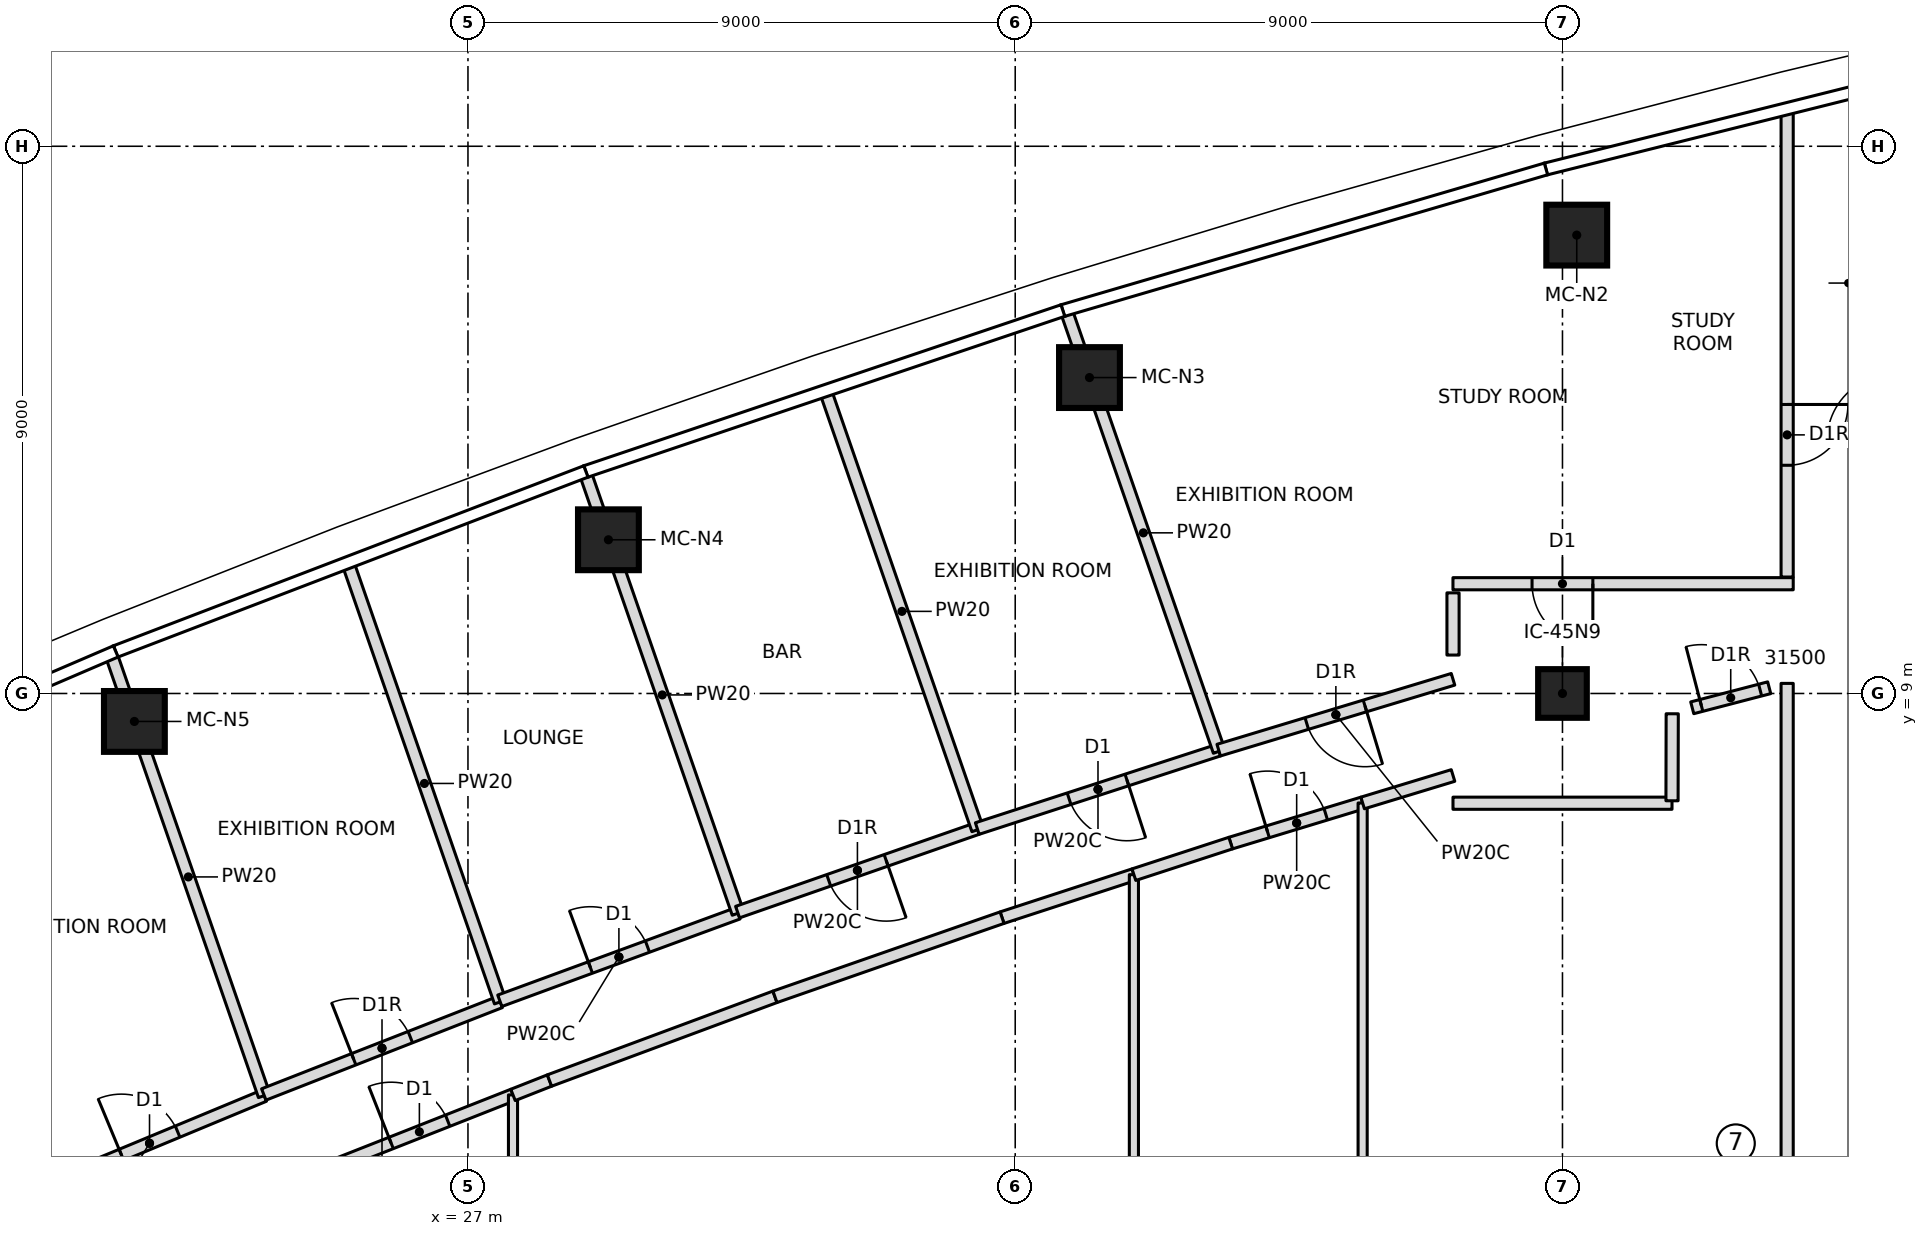
"""IFC4 building model, lengths in metres.
Left out: names, types, materials, properties, quantities, classifications, styles, units other than length and angle.
Written with IfcOpenShell. Run it as: python <this file> out.ifc"""

import sys

from ifc_helpers import new_model, si_unit, direction, frame, frame_2d, origin, origin_2d, place, context, subcontext, project, spatial, rectangle, extrude, element, fill, save


model = new_model("IFC4")
c1 = context("Model", 3, precision=1e-05, world=origin(), true_north=direction((0.0, 1.0)))
c2 = subcontext(c1, "Body", "Model", "MODEL_VIEW")
j1 = project(units=[si_unit("LENGTHUNIT", "METRE"), si_unit("PLANEANGLEUNIT", "RADIAN")], contexts=[c1])
p1 = place(None, origin())
s1 = spatial("IfcSite", under=j1, at=p1, CompositionType="ELEMENT")
p2 = place(p1, origin())
s2 = spatial("IfcBuilding", under=s1, at=p2, CompositionType="ELEMENT")
p3 = place(p2, frame((0.0, 0.0, 308.6)))
s3 = spatial("IfcBuildingStorey", under=s2, at=p3, CompositionType="ELEMENT", Elevation=308.6)
for number, where, z_axis, x_axis in (
    (1, (45.235, 16.539, 0.0), (0.0, 0.0, 1.0), (1.0, 0.0, 0.0)),
    (2, (37.221, 14.196, 0.0), (0.0, 0.0, 1.0), (1.0, 0.0, 0.0)),
    (3, (29.31, 11.528, 0.0), (0.0, 0.0, 1.0), (1.0, 0.0, 0.0)),
    (4, (21.514, 8.54, 0.0), (0.0, 0.0, 1.0), (1.0, 0.0, 0.0)),
):
    element("IfcColumn", number, at=place(p3, frame(where, z_axis=z_axis, x_axis=x_axis)), inside=s3, PredefinedType="COLUMN", context=c2, shape_type="SweptSolid", body=[
        extrude(rectangle(XDim=1.0, YDim=1.0, at=origin_2d()), origin(), (0.0, 0.0, 1.0), 4.6),
    ])
p4 = place(p3, frame((45.0, 9.0, 0.0), z_axis=(0.0, 0.0, 1.0), x_axis=(1.0, 0.0, 0.0)))
e5 = element("IfcColumn", 5, at=p4, inside=s3, PredefinedType="COLUMN", context=c2, shape_type="SweptSolid", body=[
    extrude(rectangle(XDim=0.8, YDim=0.8, at=origin_2d()), origin(), (0.0, 0.0, 1.0), 4.6),
])
p5 = place(p3, frame((19.877, 0.819, 0.0), z_axis=(0.0, 0.0, 1.0), x_axis=(0.923511375565, 0.383571035405, 0.0)))
e6 = element("IfcWall", 6, at=p5, inside=s3, PredefinedType="PARTITIONING", context=c2, shape_type="SweptSolid", body=[
    extrude(rectangle(XDim=4.084, YDim=0.2, at=frame_2d((2.042, 0.0))), origin(), (0.0, 0.0, 1.0), 4.3),
])
p6 = place(p5, frame((1.542, 0.0, 0.0)))
e7 = element("IfcOpeningElement", 7, at=p6, cuts=e6, PredefinedType="OPENING", context=c2, shape_type="SweptSolid", body=[
    extrude(rectangle(XDim=1.0, YDim=2.1, at=frame_2d((0.5, 1.05))), frame((0.0, 0.11, 0.0), z_axis=(0.0, -1.0, 0.0), x_axis=(1.0, 0.0, 0.0)), (0.0, 0.0, 1.0), 0.22),
])
p7 = place(p3, frame((23.649, 2.386, 0.0), z_axis=(0.0, 0.0, 1.0), x_axis=(-0.327708457606, 0.944778898374, 0.0)))
e8 = element("IfcWall", 8, at=p7, inside=s3, PredefinedType="PARTITIONING", context=c2, shape_type="SweptSolid", body=[
    extrude(rectangle(XDim=7.615, YDim=0.2, at=frame_2d((3.807, 0.0))), origin(), (0.0, 0.0, 1.0), 4.3),
])
p8 = place(p3, frame((23.642, 2.405, 0.0), z_axis=(0.0, 0.0, 1.0), x_axis=(0.9311815176, 0.364555868532, 0.0)))
e9 = element("IfcWall", 9, at=p8, inside=s3, PredefinedType="PARTITIONING", context=c2, shape_type="SweptSolid", body=[
    extrude(rectangle(XDim=4.176, YDim=0.2, at=frame_2d((2.088, 0.0))), origin(), (0.0, 0.0, 1.0), 4.3),
])
p9 = place(p8, frame((1.588, 0.0, 0.0)))
e10 = element("IfcOpeningElement", 10, at=p9, cuts=e9, PredefinedType="OPENING", context=c2, shape_type="SweptSolid", body=[
    extrude(rectangle(XDim=1.0, YDim=2.1, at=frame_2d((0.5, 1.05))), frame((0.0, 0.11, 0.0), z_axis=(0.0, -1.0, 0.0), x_axis=(1.0, 0.0, 0.0)), (0.0, 0.0, 1.0), 0.22),
])
p10 = place(p3, frame((27.531, 3.927, 0.0), z_axis=(0.0, 0.0, 1.0), x_axis=(-0.327730022722, 0.944771417966, 0.0)))
e11 = element("IfcWall", 11, at=p10, inside=s3, PredefinedType="PARTITIONING", context=c2, shape_type="SweptSolid", body=[
    extrude(rectangle(XDim=7.607, YDim=0.2, at=frame_2d((3.803, 0.0))), origin(), (0.0, 0.0, 1.0), 4.3),
])
p11 = place(p3, frame((27.524, 3.946, 0.0), z_axis=(0.0, 0.0, 1.0), x_axis=(0.938626470437, 0.344935282329, 0.0)))
e12 = element("IfcWall", 12, at=p11, inside=s3, PredefinedType="PARTITIONING", context=c2, shape_type="SweptSolid", body=[
    extrude(rectangle(XDim=4.173, YDim=0.2, at=frame_2d((2.086, 0.0))), origin(), (0.0, 0.0, 1.0), 4.3),
])
p12 = place(p11, frame((1.586, 0.0, 0.0)))
e13 = element("IfcOpeningElement", 13, at=p12, cuts=e12, PredefinedType="OPENING", context=c2, shape_type="SweptSolid", body=[
    extrude(rectangle(XDim=1.0, YDim=2.1, at=frame_2d((0.5, 1.05))), frame((0.0, 0.11, 0.0), z_axis=(0.0, -1.0, 0.0), x_axis=(1.0, 0.0, 0.0)), (0.0, 0.0, 1.0), 0.22),
])
p13 = place(p3, frame((31.441, 5.385, 0.0), z_axis=(0.0, 0.0, 1.0), x_axis=(-0.327746961166, 0.944765542051, 0.0)))
e14 = element("IfcWall", 14, at=p13, inside=s3, PredefinedType="PARTITIONING", context=c2, shape_type="SweptSolid", body=[
    extrude(rectangle(XDim=7.602, YDim=0.2, at=frame_2d((3.801, 0.0))), origin(), (0.0, 0.0, 1.0), 4.3),
])
p14 = place(p3, frame((35.376, 6.779, 0.0), z_axis=(0.0, 0.0, 1.0), x_axis=(-0.944236129554, -0.329269086986, 0.0)))
e15 = element("IfcWall", 15, at=p14, inside=s3, PredefinedType="PARTITIONING", context=c2, shape_type="SweptSolid", body=[
    extrude(rectangle(XDim=4.174, YDim=0.2, at=frame_2d((2.087, 0.0))), origin(), (0.0, 0.0, 1.0), 4.3),
])
p15 = place(p14, frame((1.587, 0.0, 0.0)))
e16 = element("IfcOpeningElement", 16, at=p15, cuts=e15, PredefinedType="OPENING", context=c2, shape_type="SweptSolid", body=[
    extrude(rectangle(XDim=1.0, YDim=2.1, at=frame_2d((0.5, 1.05))), frame((0.0, 0.11, 0.0), z_axis=(0.0, -1.0, 0.0), x_axis=(1.0, 0.0, 0.0)), (0.0, 0.0, 1.0), 0.22),
])
p16 = place(p3, frame((35.382, 6.76, 0.0), z_axis=(0.0, 0.0, 1.0), x_axis=(-0.327699570064, 0.944781981083, 0.0)))
e17 = element("IfcWall", 17, at=p16, inside=s3, PredefinedType="PARTITIONING", context=c2, shape_type="SweptSolid", body=[
    extrude(rectangle(XDim=7.601, YDim=0.2, at=frame_2d((3.801, 0.0))), origin(), (0.0, 0.0, 1.0), 4.3),
])
p17 = place(p3, frame((39.347, 8.068, 0.0), z_axis=(0.0, 0.0, 1.0), x_axis=(-0.951104948213, -0.308867896493, 0.0)))
e18 = element("IfcWall", 18, at=p17, inside=s3, PredefinedType="PARTITIONING", context=c2, shape_type="SweptSolid", body=[
    extrude(rectangle(XDim=4.175, YDim=0.2, at=frame_2d((2.087, 0.0))), origin(), (0.0, 0.0, 1.0), 4.3),
])
p18 = place(p17, frame((1.588, 0.0, 0.0)))
e19 = element("IfcOpeningElement", 19, at=p18, cuts=e18, PredefinedType="OPENING", context=c2, shape_type="SweptSolid", body=[
    extrude(rectangle(XDim=1.0, YDim=2.1, at=frame_2d((0.5, 1.05))), frame((0.0, 0.11, 0.0), z_axis=(0.0, -1.0, 0.0), x_axis=(1.0, 0.0, 0.0)), (0.0, 0.0, 1.0), 0.22),
])
p19 = place(p3, frame((39.354, 8.049, 0.0), z_axis=(0.0, 0.0, 1.0), x_axis=(-0.327741126954, 0.944767565967, 0.0)))
e20 = element("IfcWall", 20, at=p19, inside=s3, PredefinedType="PARTITIONING", context=c2, shape_type="SweptSolid", body=[
    extrude(rectangle(XDim=7.606, YDim=0.2, at=frame_2d((3.803, 0.0))), origin(), (0.0, 0.0, 1.0), 4.3),
])
p20 = place(p3, frame((43.2, 9.233, 0.0), z_axis=(0.0, 0.0, 1.0), x_axis=(-0.957187982889, -0.289467036833, 0.0)))
e21 = element("IfcWall", 21, at=p20, inside=s3, PredefinedType="PARTITIONING", context=c2, shape_type="SweptSolid", body=[
    extrude(rectangle(XDim=4.026, YDim=0.2, at=frame_2d((2.013, 0.0))), origin(), (0.0, 0.0, 1.0), 4.3),
])
p21 = place(p20, frame((1.513, 0.0, 0.0)))
e22 = element("IfcOpeningElement", 22, at=p21, cuts=e21, PredefinedType="OPENING", context=c2, shape_type="SweptSolid", body=[
    extrude(rectangle(XDim=1.0, YDim=2.1, at=frame_2d((0.5, 1.05))), frame((0.0, 0.11, 0.0), z_axis=(0.0, -1.0, 0.0), x_axis=(1.0, 0.0, 0.0)), (0.0, 0.0, 1.0), 0.22),
])
p22 = place(p3, frame((24.661, 1.183, 0.0), z_axis=(0.0, 0.0, 1.0), x_axis=(0.930276475833, 0.366859208023, 0.0)))
e23 = element("IfcWall", 23, at=p22, inside=s3, PredefinedType="PARTITIONING", context=c2, shape_type="SweptSolid", body=[
    extrude(rectangle(XDim=3.31, YDim=0.2, at=frame_2d((1.655, 0.0))), origin(), (0.0, 0.0, 1.0), 4.3),
])
p23 = place(p22, frame((1.155, 0.0, 0.0)))
e24 = element("IfcOpeningElement", 24, at=p23, cuts=e23, PredefinedType="OPENING", context=c2, shape_type="SweptSolid", body=[
    extrude(rectangle(XDim=1.0, YDim=2.1, at=frame_2d((0.5, 1.05))), frame((0.0, 0.11, 0.0), z_axis=(0.0, -1.0, 0.0), x_axis=(1.0, 0.0, 0.0)), (0.0, 0.0, 1.0), 0.22),
])
p24 = place(p3, frame((27.741, -2.397, 0.0), z_axis=(0.0, 0.0, 1.0), x_axis=(0.0, 1.0, 0.0)))
e25 = element("IfcWall", 25, at=p24, inside=s3, PredefinedType="PARTITIONING", context=c2, shape_type="SweptSolid", body=[
    extrude(rectangle(XDim=4.795, YDim=0.15, at=frame_2d((2.397, 0.0))), origin(), (0.0, 0.0, 1.0), 4.3),
])
p25 = place(p3, frame((35.783, 5.313, 0.0), z_axis=(0.0, 0.0, 1.0), x_axis=(0.950697596331, 0.310119461386, 0.0)))
e26 = element("IfcWall", 26, at=p25, inside=s3, PredefinedType="PARTITIONING", context=c2, shape_type="SweptSolid", body=[
    extrude(rectangle(XDim=2.281, YDim=0.2, at=frame_2d((1.14, 0.0))), origin(), (0.0, 0.0, 1.0), 4.3),
])
p26 = place(p3, frame((27.741, 2.397, 0.0), z_axis=(0.0, 0.0, 1.0), x_axis=(0.930318406692, 0.366752862524, 0.0)))
e27 = element("IfcWall", 27, at=p26, inside=s3, PredefinedType="PARTITIONING", context=c2, shape_type="SweptSolid", body=[
    extrude(rectangle(XDim=0.645, YDim=0.2, at=frame_2d((0.323, 0.0))), origin(), (0.0, 0.0, 1.0), 4.3),
])
p27 = place(p3, frame((28.341, 2.634, 0.0), z_axis=(0.0, 0.0, 1.0), x_axis=(0.937463259708, 0.348084237933, 0.0)))
e28 = element("IfcWall", 28, at=p27, inside=s3, PredefinedType="PARTITIONING", context=c2, shape_type="SweptSolid", body=[
    extrude(rectangle(XDim=3.955, YDim=0.2, at=frame_2d((1.978, 0.0))), origin(), (0.0, 0.0, 1.0), 4.3),
])
p28 = place(p3, frame((32.049, 4.011, 0.0), z_axis=(0.0, 0.0, 1.0), x_axis=(0.94426757098, 0.329178909402, 0.0)))
e29 = element("IfcWall", 29, at=p28, inside=s3, PredefinedType="PARTITIONING", context=c2, shape_type="SweptSolid", body=[
    extrude(rectangle(XDim=3.955, YDim=0.2, at=frame_2d((1.978, 0.0))), origin(), (0.0, 0.0, 1.0), 4.3),
])
p29 = place(p3, frame((37.952, -6.02, 0.0), z_axis=(0.0, 0.0, 1.0), x_axis=(0.0, 1.0, 0.0)))
e30 = element("IfcWall", 30, at=p29, inside=s3, PredefinedType="PARTITIONING", context=c2, shape_type="SweptSolid", body=[
    extrude(rectangle(XDim=12.04, YDim=0.15, at=frame_2d((6.02, 0.0))), origin(), (0.0, 0.0, 1.0), 4.3),
])
p30 = place(p3, frame((39.544, 6.539, 0.0), z_axis=(0.0, 0.0, 1.0), x_axis=(0.956735130354, 0.290960289981, 0.0)))
e31 = element("IfcWall", 31, at=p30, inside=s3, PredefinedType="PARTITIONING", context=c2, shape_type="SweptSolid", body=[
    extrude(rectangle(XDim=2.268, YDim=0.2, at=frame_2d((1.134, 0.0))), origin(), (0.0, 0.0, 1.0), 4.3),
])
p31 = place(p30, frame((0.634, 0.0, 0.0)))
e32 = element("IfcOpeningElement", 32, at=p31, cuts=e31, PredefinedType="OPENING", context=c2, shape_type="SweptSolid", body=[
    extrude(rectangle(XDim=1.0, YDim=2.1, at=frame_2d((0.5, 1.05))), frame((0.0, 0.11, 0.0), z_axis=(0.0, -1.0, 0.0), x_axis=(1.0, 0.0, 0.0)), (0.0, 0.0, 1.0), 0.22),
])
p32 = place(p3, frame((37.952, 6.02, 0.0), z_axis=(0.0, 0.0, 1.0), x_axis=(0.950704614016, 0.310097947249, 0.0)))
e33 = element("IfcWall", 33, at=p32, inside=s3, PredefinedType="PARTITIONING", context=c2, shape_type="SweptSolid", body=[
    extrude(rectangle(XDim=1.675, YDim=0.2, at=frame_2d((0.837, 0.0))), origin(), (0.0, 0.0, 1.0), 4.3),
])
p33 = place(p3, frame((41.714, -7.199, 0.0), z_axis=(0.0, 0.0, 1.0), x_axis=(0.0, 1.0, 0.0)))
e34 = element("IfcWall", 34, at=p33, inside=s3, PredefinedType="PARTITIONING", context=c2, shape_type="SweptSolid", body=[
    extrude(rectangle(XDim=14.398, YDim=0.15, at=frame_2d((7.199, 0.0))), origin(), (0.0, 0.0, 1.0), 4.3),
])
p34 = place(p3, frame((41.714, 7.199, 0.0), z_axis=(0.0, 0.0, 1.0), x_axis=(0.956755682532, 0.290892701769, 0.0)))
e35 = element("IfcWall", 35, at=p34, inside=s3, PredefinedType="PARTITIONING", context=c2, shape_type="SweptSolid", body=[
    extrude(rectangle(XDim=1.553, YDim=0.2, at=frame_2d((0.777, 0.0))), origin(), (0.0, 0.0, 1.0), 4.3),
])
p35 = place(p3, frame((48.795, 10.805, 0.0), z_axis=(0.0, 0.0, 1.0), x_axis=(-0.999999999048, -4.3628114e-05, 0.0)))
e36 = element("IfcWall", 36, at=p35, inside=s3, PredefinedType="PARTITIONING", context=c2, shape_type="SweptSolid", body=[
    extrude(rectangle(XDim=5.596, YDim=0.2, at=frame_2d((2.798, 0.0))), origin(), (0.0, 0.0, 1.0), 4.3),
])
p36 = place(p35, frame((3.295, 0.0, 0.0)))
e37 = element("IfcOpeningElement", 37, at=p36, cuts=e36, PredefinedType="OPENING", context=c2, shape_type="SweptSolid", body=[
    extrude(rectangle(XDim=1.0, YDim=2.1, at=frame_2d((0.5, 1.05))), frame((0.0, 0.11, 0.0), z_axis=(0.0, -1.0, 0.0), x_axis=(1.0, 0.0, 0.0)), (0.0, 0.0, 1.0), 0.22),
])
p37 = place(p3, frame((47.134, 8.764, 0.0), z_axis=(0.0, 0.0, 1.0), x_axis=(0.967678694968, 0.252186326563, 0.0)))
e38 = element("IfcWall", 38, at=p37, inside=s3, PredefinedType="PARTITIONING", context=c2, shape_type="SweptSolid", body=[
    extrude(rectangle(XDim=1.308, YDim=0.2, at=frame_2d((0.654, 0.0))), origin(), (0.0, 0.0, 1.0), 4.3),
])
p38 = place(p37, frame((0.154, 0.0, 0.0)))
e39 = element("IfcOpeningElement", 39, at=p38, cuts=e38, PredefinedType="OPENING", context=c2, shape_type="SweptSolid", body=[
    extrude(rectangle(XDim=1.0, YDim=2.1, at=frame_2d((0.5, 1.05))), frame((0.0, 0.11, 0.0), z_axis=(0.0, -1.0, 0.0), x_axis=(1.0, 0.0, 0.0)), (0.0, 0.0, 1.0), 0.22),
])
p39 = place(p3, frame((48.695, 18.589, 0.0), z_axis=(0.0, 0.0, 1.0), x_axis=(0.0, -1.0, 0.0)))
e40 = element("IfcWall", 40, at=p39, inside=s3, PredefinedType="PARTITIONING", context=c2, shape_type="SweptSolid", body=[
    extrude(rectangle(XDim=7.674, YDim=0.2, at=frame_2d((3.837, 0.0))), origin(), (0.0, 0.0, 1.0), 4.3),
])
p40 = place(p39, frame((4.836, 0.0, 0.0)))
e41 = element("IfcOpeningElement", 41, at=p40, cuts=e40, PredefinedType="OPENING", context=c2, shape_type="SweptSolid", body=[
    extrude(rectangle(XDim=1.0, YDim=2.1, at=frame_2d((0.5, 1.05))), frame((0.0, 0.11, 0.0), z_axis=(0.0, -1.0, 0.0), x_axis=(1.0, 0.0, 0.0)), (0.0, 0.0, 1.0), 0.22),
])
p41 = place(p3, frame((43.199, 7.195, 0.0), z_axis=(0.0, 0.0, 1.0), x_axis=(0.999999997703, 6.7778229e-05, 0.0)))
e42 = element("IfcWall", 42, at=p41, inside=s3, PredefinedType="PARTITIONING", context=c2, shape_type="SweptSolid", body=[
    extrude(rectangle(XDim=3.602, YDim=0.2, at=frame_2d((1.801, 0.0))), origin(), (0.0, 0.0, 1.0), 4.3),
])
p42 = place(p3, frame((46.802, 7.235, 0.0), z_axis=(0.0, 0.0, 1.0), x_axis=(0.00238825658, 0.999997148111, 0.0)))
e43 = element("IfcWall", 43, at=p42, inside=s3, PredefinedType="PARTITIONING", context=c2, shape_type="SweptSolid", body=[
    extrude(rectangle(XDim=1.431, YDim=0.2, at=frame_2d((0.716, 0.0))), origin(), (0.0, 0.0, 1.0), 4.3),
])
p43 = place(p3, frame((48.695, 9.166, 0.0), z_axis=(0.0, 0.0, 1.0), x_axis=(0.0, -1.0, 0.0)))
e44 = element("IfcWall", 44, at=p43, inside=s3, PredefinedType="PARTITIONING", context=c2, shape_type="SweptSolid", body=[
    extrude(rectangle(XDim=18.332, YDim=0.2, at=frame_2d((9.166, 0.0))), origin(), (0.0, 0.0, 1.0), 4.3),
])
p44 = place(p3, frame((43.2, 9.632, 0.0), z_axis=(0.0, 0.0, 1.0), x_axis=(0.0, 1.0, 0.0)))
e45 = element("IfcWall", 45, at=p44, inside=s3, PredefinedType="PARTITIONING", context=c2, shape_type="SweptSolid", body=[
    extrude(rectangle(XDim=1.023, YDim=0.2, at=frame_2d((0.511, 0.0))), origin(), (0.0, 0.0, 1.0), 4.3),
])
p45 = place(p6, origin())
e46 = element("IfcDoor", 46, at=p45, inside=s3, OperationType="SINGLE_SWING_LEFT", PredefinedType="DOOR", context=c2, shape_type="SweptSolid", body=[
    extrude(rectangle(XDim=1.0, YDim=2.1, at=frame_2d((0.5, 1.05))), frame((0.0, 0.025, 0.0), z_axis=(0.0, -1.0, 0.0), x_axis=(1.0, 0.0, 0.0)), (0.0, 0.0, 1.0), 0.05),
])
fill(e7, e46)
p46 = place(p9, origin())
e47 = element("IfcDoor", 47, at=p46, inside=s3, OperationType="SINGLE_SWING_RIGHT", PredefinedType="DOOR", context=c2, shape_type="SweptSolid", body=[
    extrude(rectangle(XDim=1.0, YDim=2.1, at=frame_2d((0.5, 1.05))), frame((0.0, 0.025, 0.0), z_axis=(0.0, -1.0, 0.0), x_axis=(1.0, 0.0, 0.0)), (0.0, 0.0, 1.0), 0.05),
])
fill(e10, e47)
p47 = place(p12, origin())
e48 = element("IfcDoor", 48, at=p47, inside=s3, OperationType="SINGLE_SWING_LEFT", PredefinedType="DOOR", context=c2, shape_type="SweptSolid", body=[
    extrude(rectangle(XDim=1.0, YDim=2.1, at=frame_2d((0.5, 1.05))), frame((0.0, 0.025, 0.0), z_axis=(0.0, -1.0, 0.0), x_axis=(1.0, 0.0, 0.0)), (0.0, 0.0, 1.0), 0.05),
])
fill(e13, e48)
p48 = place(p15, origin())
e49 = element("IfcDoor", 49, at=p48, inside=s3, OperationType="SINGLE_SWING_RIGHT", PredefinedType="DOOR", context=c2, shape_type="SweptSolid", body=[
    extrude(rectangle(XDim=1.0, YDim=2.1, at=frame_2d((0.5, 1.05))), frame((0.0, 0.025, 0.0), z_axis=(0.0, -1.0, 0.0), x_axis=(1.0, 0.0, 0.0)), (0.0, 0.0, 1.0), 0.05),
])
fill(e16, e49)
p49 = place(p18, origin())
e50 = element("IfcDoor", 50, at=p49, inside=s3, OperationType="SINGLE_SWING_LEFT", PredefinedType="DOOR", context=c2, shape_type="SweptSolid", body=[
    extrude(rectangle(XDim=1.0, YDim=2.1, at=frame_2d((0.5, 1.05))), frame((0.0, 0.025, 0.0), z_axis=(0.0, -1.0, 0.0), x_axis=(1.0, 0.0, 0.0)), (0.0, 0.0, 1.0), 0.05),
])
fill(e19, e50)
p50 = place(p21, origin())
e51 = element("IfcDoor", 51, at=p50, inside=s3, OperationType="SINGLE_SWING_RIGHT", PredefinedType="DOOR", context=c2, shape_type="SweptSolid", body=[
    extrude(rectangle(XDim=1.0, YDim=2.1, at=frame_2d((0.5, 1.05))), frame((0.0, 0.025, 0.0), z_axis=(0.0, -1.0, 0.0), x_axis=(1.0, 0.0, 0.0)), (0.0, 0.0, 1.0), 0.05),
])
fill(e22, e51)
p51 = place(p23, origin())
e52 = element("IfcDoor", 52, at=p51, inside=s3, OperationType="SINGLE_SWING_LEFT", PredefinedType="DOOR", context=c2, shape_type="SweptSolid", body=[
    extrude(rectangle(XDim=1.0, YDim=2.1, at=frame_2d((0.5, 1.05))), frame((0.0, 0.025, 0.0), z_axis=(0.0, -1.0, 0.0), x_axis=(1.0, 0.0, 0.0)), (0.0, 0.0, 1.0), 0.05),
])
fill(e24, e52)
p52 = place(p31, origin())
e53 = element("IfcDoor", 53, at=p52, inside=s3, OperationType="SINGLE_SWING_LEFT", PredefinedType="DOOR", context=c2, shape_type="SweptSolid", body=[
    extrude(rectangle(XDim=1.0, YDim=2.1, at=frame_2d((0.5, 1.05))), frame((0.0, 0.025, 0.0), z_axis=(0.0, -1.0, 0.0), x_axis=(1.0, 0.0, 0.0)), (0.0, 0.0, 1.0), 0.05),
])
fill(e32, e53)
p53 = place(p38, origin())
e54 = element("IfcDoor", 54, at=p53, inside=s3, OperationType="SINGLE_SWING_RIGHT", PredefinedType="DOOR", context=c2, shape_type="SweptSolid", body=[
    extrude(rectangle(XDim=1.0, YDim=2.1, at=frame_2d((0.5, 1.05))), frame((0.0, 0.025, 0.0), z_axis=(0.0, -1.0, 0.0), x_axis=(1.0, 0.0, 0.0)), (0.0, 0.0, 1.0), 0.05),
])
fill(e39, e54)
p54 = place(p36, origin())
e55 = element("IfcDoor", 55, at=p54, inside=s3, OperationType="SINGLE_SWING_LEFT", PredefinedType="DOOR", context=c2, shape_type="SweptSolid", body=[
    extrude(rectangle(XDim=1.0, YDim=2.1, at=frame_2d((0.5, 1.05))), frame((0.0, 0.025, 0.0), z_axis=(0.0, -1.0, 0.0), x_axis=(1.0, 0.0, 0.0)), (0.0, 0.0, 1.0), 0.05),
])
fill(e37, e55)
p55 = place(p40, origin())
e56 = element("IfcDoor", 56, at=p55, inside=s3, OperationType="SINGLE_SWING_RIGHT", PredefinedType="DOOR", context=c2, shape_type="SweptSolid", body=[
    extrude(rectangle(XDim=1.0, YDim=2.1, at=frame_2d((0.5, 1.05))), frame((0.0, 0.025, 0.0), z_axis=(0.0, -1.0, 0.0), x_axis=(1.0, 0.0, 0.0)), (0.0, 0.0, 1.0), 0.05),
])
fill(e41, e56)
save(model, sys.argv[1])
